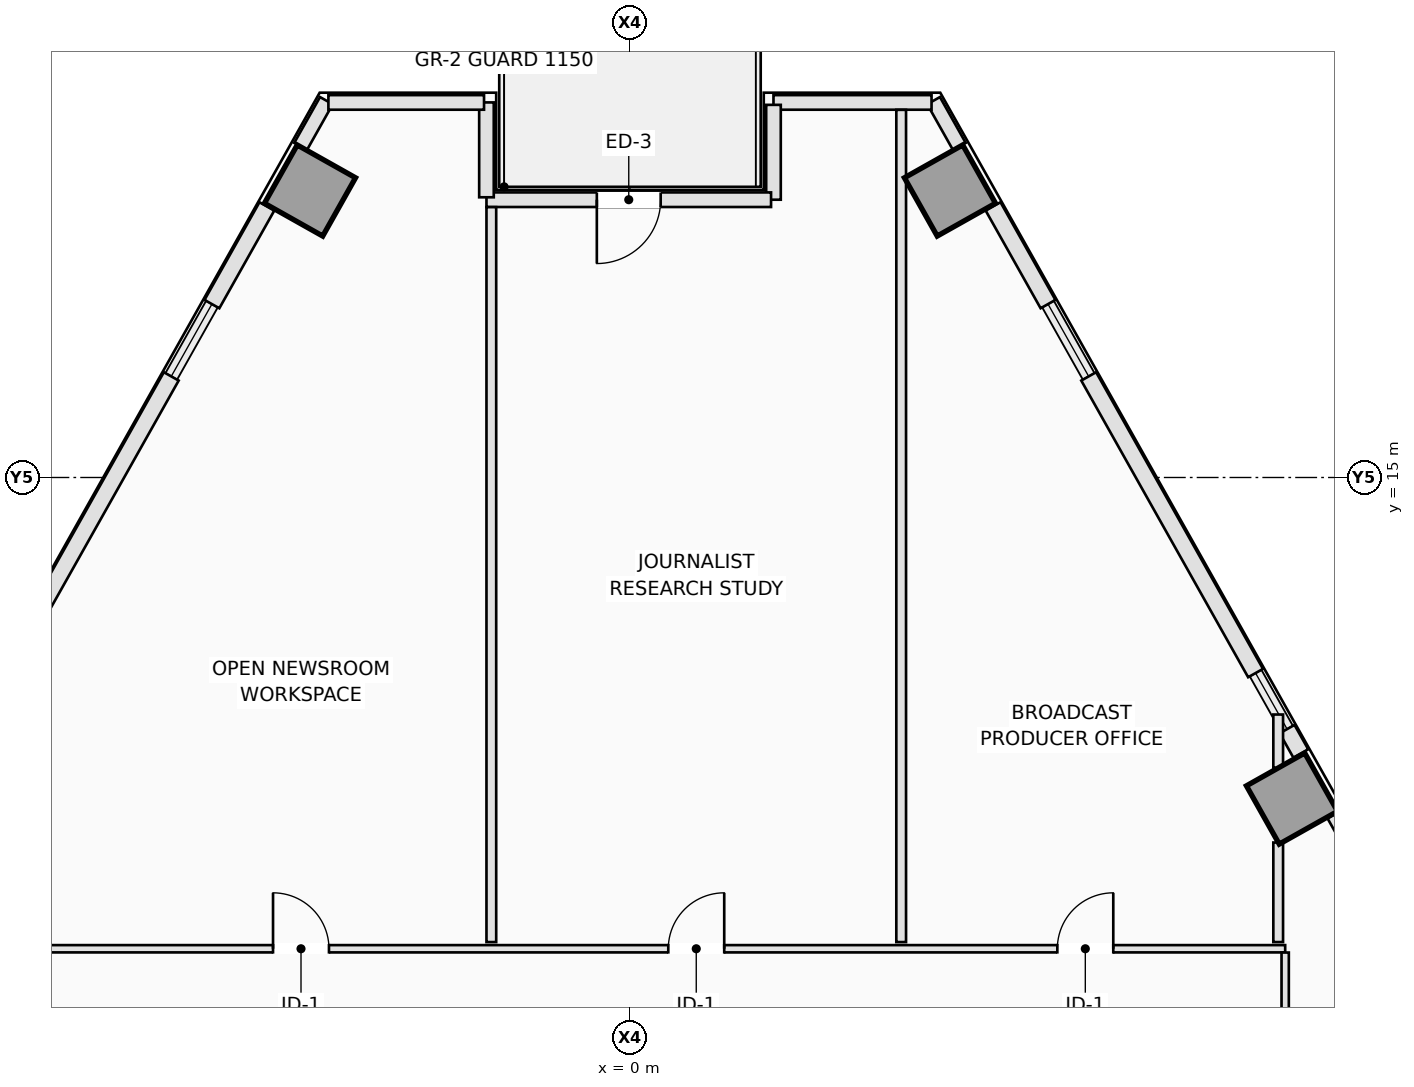
"""IFC4 building model, lengths in metres.
Left out: names, types, materials, properties, quantities, classifications, styles, units other than length and angle.
Written with IfcOpenShell. Run it as: python <this file> out.ifc"""

import sys

from ifc_helpers import new_model, si_unit, direction, frame, frame_2d, origin, origin_2d, place, context, subcontext, project, spatial, rectangle, extrude, element, fill, save


model = new_model("IFC4")
c1 = context("Model", 3, precision=1e-05, world=origin(), true_north=direction((0.0, 1.0)))
c2 = subcontext(c1, "Body", "Model", "MODEL_VIEW")
j1 = project(units=[si_unit("LENGTHUNIT", "METRE"), si_unit("PLANEANGLEUNIT", "RADIAN")], contexts=[c1])
p1 = place(None, origin())
s1 = spatial("IfcSite", under=j1, at=p1, CompositionType="ELEMENT")
p2 = place(p1, origin())
s2 = spatial("IfcBuilding", under=s1, at=p2, CompositionType="ELEMENT")
p3 = place(p2, frame((0.0, 0.0, 95.0)))
s3 = spatial("IfcBuildingStorey", under=s2, at=p3, CompositionType="ELEMENT", Elevation=95.0)
for number, where, z_axis, x_axis in (
    (1, (10.887, 9.72, 0.0), (0.0, 0.0, 1.0), (0.872, 0.49, 0.0)),
    (2, (5.262, 19.719, 0.0), (0.0, 0.0, 1.0), (0.872, 0.49, 0.0)),
    (3, (-5.262, 19.719, 0.0), (0.0, 0.0, 1.0), (-0.872, 0.49, 0.0)),
):
    element("IfcColumn", number, at=place(p3, frame(where, z_axis=z_axis, x_axis=x_axis)), inside=s3, PredefinedType="COLUMN", context=c2, shape_type="SweptSolid", body=[
        extrude(rectangle(XDim=1.1, YDim=1.1, at=origin_2d()), origin(), (0.0, 0.0, 1.0), 3.5),
    ])
p4 = place(p3, frame((4.993, 21.197, 0.0), z_axis=(0.0, 0.0, 1.0), x_axis=(0.490355003566, -0.871522788272, 0.0)))
e4 = element("IfcWall", 4, at=p4, inside=s3, PredefinedType="STANDARD", context=c2, shape_type="SweptSolid", body=[
    extrude(rectangle(XDim=0.865, YDim=0.24, at=frame_2d((0.433, 0.0))), origin(), (0.0, 0.0, 1.0), 3.25),
])
p5 = place(p3, frame((5.971, 19.458, 0.0), z_axis=(0.0, 0.0, 1.0), x_axis=(0.490280102884, -0.871564926277, 0.0)))
e5 = element("IfcWall", 5, at=p5, inside=s3, PredefinedType="STANDARD", context=c2, shape_type="SweptSolid", body=[
    extrude(rectangle(XDim=1.844, YDim=0.28, at=frame_2d((0.922, 0.0))), origin(), (0.0, 0.0, 1.0), 3.25),
])
p6 = place(p3, frame((7.544, 16.662, 0.0), z_axis=(0.0, 0.0, 1.0), x_axis=(0.490298514233, -0.871554569113, 0.0)))
e6 = element("IfcWall", 6, at=p6, inside=s3, PredefinedType="STANDARD", context=c2, shape_type="SweptSolid", body=[
    extrude(rectangle(XDim=5.597, YDim=0.28, at=frame_2d((2.799, 0.0))), origin(), (0.0, 0.0, 1.0), 3.25),
])
p7 = place(p3, frame((10.806, 10.862, 0.0), z_axis=(0.0, 0.0, 1.0), x_axis=(0.490412424957, -0.871490478116, 0.0)))
e7 = element("IfcWall", 7, at=p7, inside=s3, PredefinedType="STANDARD", context=c2, shape_type="SweptSolid", body=[
    extrude(rectangle(XDim=0.46, YDim=0.28, at=frame_2d((0.23, 0.0))), origin(), (0.0, 0.0, 1.0), 3.25),
])
p8 = place(p3, frame((11.593, 9.463, 0.0), z_axis=(0.0, 0.0, 1.0), x_axis=(0.490293592365, -0.871557337922, 0.0)))
e8 = element("IfcWall", 8, at=p8, inside=s3, PredefinedType="STANDARD", context=c2, shape_type="SweptSolid", body=[
    extrude(rectangle(XDim=4.299, YDim=0.28, at=frame_2d((2.15, 0.0))), origin(), (0.0, 0.0, 1.0), 3.25),
])
p9 = place(p3, frame((-5.417, 20.443, 0.0), z_axis=(0.0, 0.0, 1.0), x_axis=(0.490355003566, 0.871522788272, 0.0)))
e9 = element("IfcWall", 9, at=p9, inside=s3, PredefinedType="STANDARD", context=c2, shape_type="SweptSolid", body=[
    extrude(rectangle(XDim=0.865, YDim=0.24, at=frame_2d((0.433, 0.0))), origin(), (0.0, 0.0, 1.0), 3.25),
])
p10 = place(p3, frame((-10.288, 11.784, 0.0), z_axis=(0.0, 0.0, 1.0), x_axis=(0.490298514233, 0.871554569113, 0.0)))
e10 = element("IfcWall", 10, at=p10, inside=s3, PredefinedType="STANDARD", context=c2, shape_type="SweptSolid", body=[
    extrude(rectangle(XDim=5.597, YDim=0.28, at=frame_2d((2.799, 0.0))), origin(), (0.0, 0.0, 1.0), 3.25),
])
p11 = place(p3, frame((-6.875, 17.852, 0.0), z_axis=(0.0, 0.0, 1.0), x_axis=(0.490280102884, 0.871564926277, 0.0)))
e11 = element("IfcWall", 11, at=p11, inside=s3, PredefinedType="STANDARD", context=c2, shape_type="SweptSolid", body=[
    extrude(rectangle(XDim=1.844, YDim=0.28, at=frame_2d((0.922, 0.0))), origin(), (0.0, 0.0, 1.0), 3.25),
])
p12 = place(p3, frame((4.959, 21.168, 0.0), z_axis=(0.0, 0.0, 1.0), x_axis=(-1.0, 0.0, 0.0)))
e12 = element("IfcWall", 12, at=p12, inside=s3, PredefinedType="STANDARD", context=c2, shape_type="SweptSolid", body=[
    extrude(rectangle(XDim=2.599, YDim=0.24, at=frame_2d((1.3, 0.0))), origin(), (0.0, 0.0, 1.0), 3.25),
])
p13 = place(p3, frame((2.36, 21.128, 0.0), z_axis=(0.0, 0.0, 1.0), x_axis=(0.0, -1.0, 0.0)))
e13 = element("IfcWall", 13, at=p13, inside=s3, PredefinedType="STANDARD", context=c2, shape_type="SweptSolid", body=[
    extrude(rectangle(XDim=1.56, YDim=0.24, at=frame_2d((0.78, 0.0))), origin(), (0.0, 0.0, 1.0), 3.25),
])
p14 = place(p3, frame((2.32, 19.568, 0.0), z_axis=(0.0, 0.0, 1.0), x_axis=(-1.0, 0.0, 0.0)))
e14 = element("IfcWall", 14, at=p14, inside=s3, PredefinedType="STANDARD", context=c2, shape_type="SweptSolid", body=[
    extrude(rectangle(XDim=4.68, YDim=0.24, at=frame_2d((2.34, 0.0))), origin(), (0.0, 0.0, 1.0), 2.722),
])
p15 = place(p14, frame((1.815, 0.0, 0.0)))
e15 = element("IfcOpeningElement", 15, at=p15, cuts=e14, PredefinedType="OPENING", context=c2, shape_type="SweptSolid", body=[
    extrude(rectangle(XDim=1.05, YDim=2.2, at=frame_2d((0.525, 1.1))), frame((0.0, 0.13, 0.0), z_axis=(0.0, -1.0, 0.0), x_axis=(1.0, 0.0, 0.0)), (0.0, 0.0, 1.0), 0.26),
])
p16 = place(p3, frame((-2.36, 19.608, 0.0), z_axis=(0.0, 0.0, 1.0), x_axis=(0.0, 1.0, 0.0)))
e16 = element("IfcWall", 16, at=p16, inside=s3, PredefinedType="STANDARD", context=c2, shape_type="SweptSolid", body=[
    extrude(rectangle(XDim=1.56, YDim=0.24, at=frame_2d((0.78, 0.0))), origin(), (0.0, 0.0, 1.0), 3.25),
])
p17 = place(p3, frame((-2.4, 21.168, 0.0), z_axis=(0.0, 0.0, 1.0), x_axis=(-1.0, 0.0, 0.0)))
e17 = element("IfcWall", 17, at=p17, inside=s3, PredefinedType="STANDARD", context=c2, shape_type="SweptSolid", body=[
    extrude(rectangle(XDim=2.56, YDim=0.24, at=frame_2d((1.28, 0.0))), origin(), (0.0, 0.0, 1.0), 3.25),
])
p18 = place(p3, frame((-10.863, 7.25, 0.0), z_axis=(0.0, 0.0, 1.0), x_axis=(1.0, 0.0, 0.0)))
e18 = element("IfcWall", 18, at=p18, inside=s3, PredefinedType="PARTITIONING", context=c2, shape_type="SweptSolid", body=[
    extrude(rectangle(XDim=21.638, YDim=0.12, at=frame_2d((10.819, 0.0))), origin(), (0.0, 0.0, 1.0), 3.25),
])
p19 = place(p18, frame((11.493, 0.0, 0.0)))
e19 = element("IfcOpeningElement", 19, at=p19, cuts=e18, PredefinedType="OPENING", context=c2, shape_type="SweptSolid", body=[
    extrude(rectangle(XDim=0.92, YDim=2.12, at=frame_2d((0.46, 1.06))), frame((0.0, 0.07, 0.0), z_axis=(0.0, -1.0, 0.0), x_axis=(1.0, 0.0, 0.0)), (0.0, 0.0, 1.0), 0.14),
])
p20 = place(p18, frame((4.993, 0.0, 0.0)))
e20 = element("IfcOpeningElement", 20, at=p20, cuts=e18, PredefinedType="OPENING", context=c2, shape_type="SweptSolid", body=[
    extrude(rectangle(XDim=0.92, YDim=2.12, at=frame_2d((0.46, 1.06))), frame((0.0, 0.07, 0.0), z_axis=(0.0, -1.0, 0.0), x_axis=(1.0, 0.0, 0.0)), (0.0, 0.0, 1.0), 0.14),
])
p21 = place(p18, frame((17.891, 0.0, 0.0)))
e21 = element("IfcOpeningElement", 21, at=p21, cuts=e18, PredefinedType="OPENING", context=c2, shape_type="SweptSolid", body=[
    extrude(rectangle(XDim=0.92, YDim=2.12, at=frame_2d((0.46, 1.06))), frame((0.0, 0.07, 0.0), z_axis=(0.0, -1.0, 0.0), x_axis=(1.0, 0.0, 0.0)), (0.0, 0.0, 1.0), 0.14),
])
p22 = place(p3, frame((10.775, 7.188, 0.0), z_axis=(0.0, 0.0, 1.0), x_axis=(0.0, -1.0, 0.0)))
e22 = element("IfcWall", 22, at=p22, inside=s3, PredefinedType="PARTITIONING", context=c2, shape_type="SweptSolid", body=[
    extrude(rectangle(XDim=9.588, YDim=0.12, at=frame_2d((4.794, 0.0))), origin(), (0.0, 0.0, 1.0), 3.25),
])
p23 = place(p22, frame((1.562, 0.0, 0.0)))
e23 = element("IfcOpeningElement", 23, at=p23, cuts=e22, PredefinedType="OPENING", context=c2, shape_type="SweptSolid", body=[
    extrude(rectangle(XDim=0.92, YDim=2.12, at=frame_2d((0.46, 1.06))), frame((0.0, 0.07, 0.0), z_axis=(0.0, -1.0, 0.0), x_axis=(1.0, 0.0, 0.0)), (0.0, 0.0, 1.0), 0.14),
])
p24 = place(p22, frame((4.788, 0.0, 0.0)))
e24 = element("IfcOpeningElement", 24, at=p24, cuts=e22, PredefinedType="OPENING", context=c2, shape_type="SweptSolid", body=[
    extrude(rectangle(XDim=0.92, YDim=2.12, at=frame_2d((0.46, 1.06))), frame((0.0, 0.07, 0.0), z_axis=(0.0, -1.0, 0.0), x_axis=(1.0, 0.0, 0.0)), (0.0, 0.0, 1.0), 0.14),
])
p25 = place(p3, frame((-2.28, 7.36, 0.0), z_axis=(0.0, 0.0, 1.0), x_axis=(0.0, 1.0, 0.0)))
e25 = element("IfcWall", 25, at=p25, inside=s3, PredefinedType="PARTITIONING", context=c2, shape_type="SweptSolid", body=[
    extrude(rectangle(XDim=12.086, YDim=0.16, at=frame_2d((6.043, 0.0))), origin(), (0.0, 0.0, 1.0), 3.25),
])
p26 = place(p3, frame((4.46, 21.046, 0.0), z_axis=(0.0, 0.0, 1.0), x_axis=(0.0, -1.0, 0.0)))
e26 = element("IfcWall", 26, at=p26, inside=s3, PredefinedType="PARTITIONING", context=c2, shape_type="SweptSolid", body=[
    extrude(rectangle(XDim=13.686, YDim=0.16, at=frame_2d((6.843, 0.0))), origin(), (0.0, 0.0, 1.0), 2.434),
])
p27 = place(p3, frame((10.66, 11.102, 0.0), z_axis=(0.0, 0.0, 1.0), x_axis=(0.0, -1.0, 0.0)))
e27 = element("IfcWall", 27, at=p27, inside=s3, PredefinedType="PARTITIONING", context=c2, shape_type="SweptSolid", body=[
    extrude(rectangle(XDim=0.877, YDim=0.16, at=frame_2d((0.438, 0.0))), origin(), (0.0, 0.0, 1.0), 3.25),
])
p28 = place(p3, frame((10.66, 8.997, 0.0), z_axis=(0.0, 0.0, 1.0), x_axis=(0.0, -1.0, 0.0)))
e28 = element("IfcWall", 28, at=p28, inside=s3, PredefinedType="PARTITIONING", context=c2, shape_type="SweptSolid", body=[
    extrude(rectangle(XDim=1.637, YDim=0.16, at=frame_2d((0.818, 0.0))), origin(), (0.0, 0.0, 1.0), 3.25),
])
p29 = place(p15, origin())
e29 = element("IfcDoor", 29, at=p29, inside=s3, OperationType="SINGLE_SWING_RIGHT", PredefinedType="DOOR", context=c2, shape_type="SweptSolid", body=[
    extrude(rectangle(XDim=1.05, YDim=2.2, at=frame_2d((0.525, 1.1))), frame((0.0, 0.025, 0.0), z_axis=(0.0, -1.0, 0.0), x_axis=(1.0, 0.0, 0.0)), (0.0, 0.0, 1.0), 0.05),
])
fill(e15, e29)
p30 = place(p19, origin())
e30 = element("IfcDoor", 30, at=p30, inside=s3, OperationType="SINGLE_SWING_RIGHT", PredefinedType="DOOR", context=c2, shape_type="SweptSolid", body=[
    extrude(rectangle(XDim=0.92, YDim=2.12, at=frame_2d((0.46, 1.06))), frame((0.0, 0.025, 0.0), z_axis=(0.0, -1.0, 0.0), x_axis=(1.0, 0.0, 0.0)), (0.0, 0.0, 1.0), 0.05),
])
fill(e19, e30)
p31 = place(p20, origin())
e31 = element("IfcDoor", 31, at=p31, inside=s3, OperationType="SINGLE_SWING_LEFT", PredefinedType="DOOR", context=c2, shape_type="SweptSolid", body=[
    extrude(rectangle(XDim=0.92, YDim=2.12, at=frame_2d((0.46, 1.06))), frame((0.0, 0.025, 0.0), z_axis=(0.0, -1.0, 0.0), x_axis=(1.0, 0.0, 0.0)), (0.0, 0.0, 1.0), 0.05),
])
fill(e20, e31)
p32 = place(p21, origin())
e32 = element("IfcDoor", 32, at=p32, inside=s3, OperationType="SINGLE_SWING_RIGHT", PredefinedType="DOOR", context=c2, shape_type="SweptSolid", body=[
    extrude(rectangle(XDim=0.92, YDim=2.12, at=frame_2d((0.46, 1.06))), frame((0.0, 0.025, 0.0), z_axis=(0.0, -1.0, 0.0), x_axis=(1.0, 0.0, 0.0)), (0.0, 0.0, 1.0), 0.05),
])
fill(e21, e32)
save(model, sys.argv[1])
